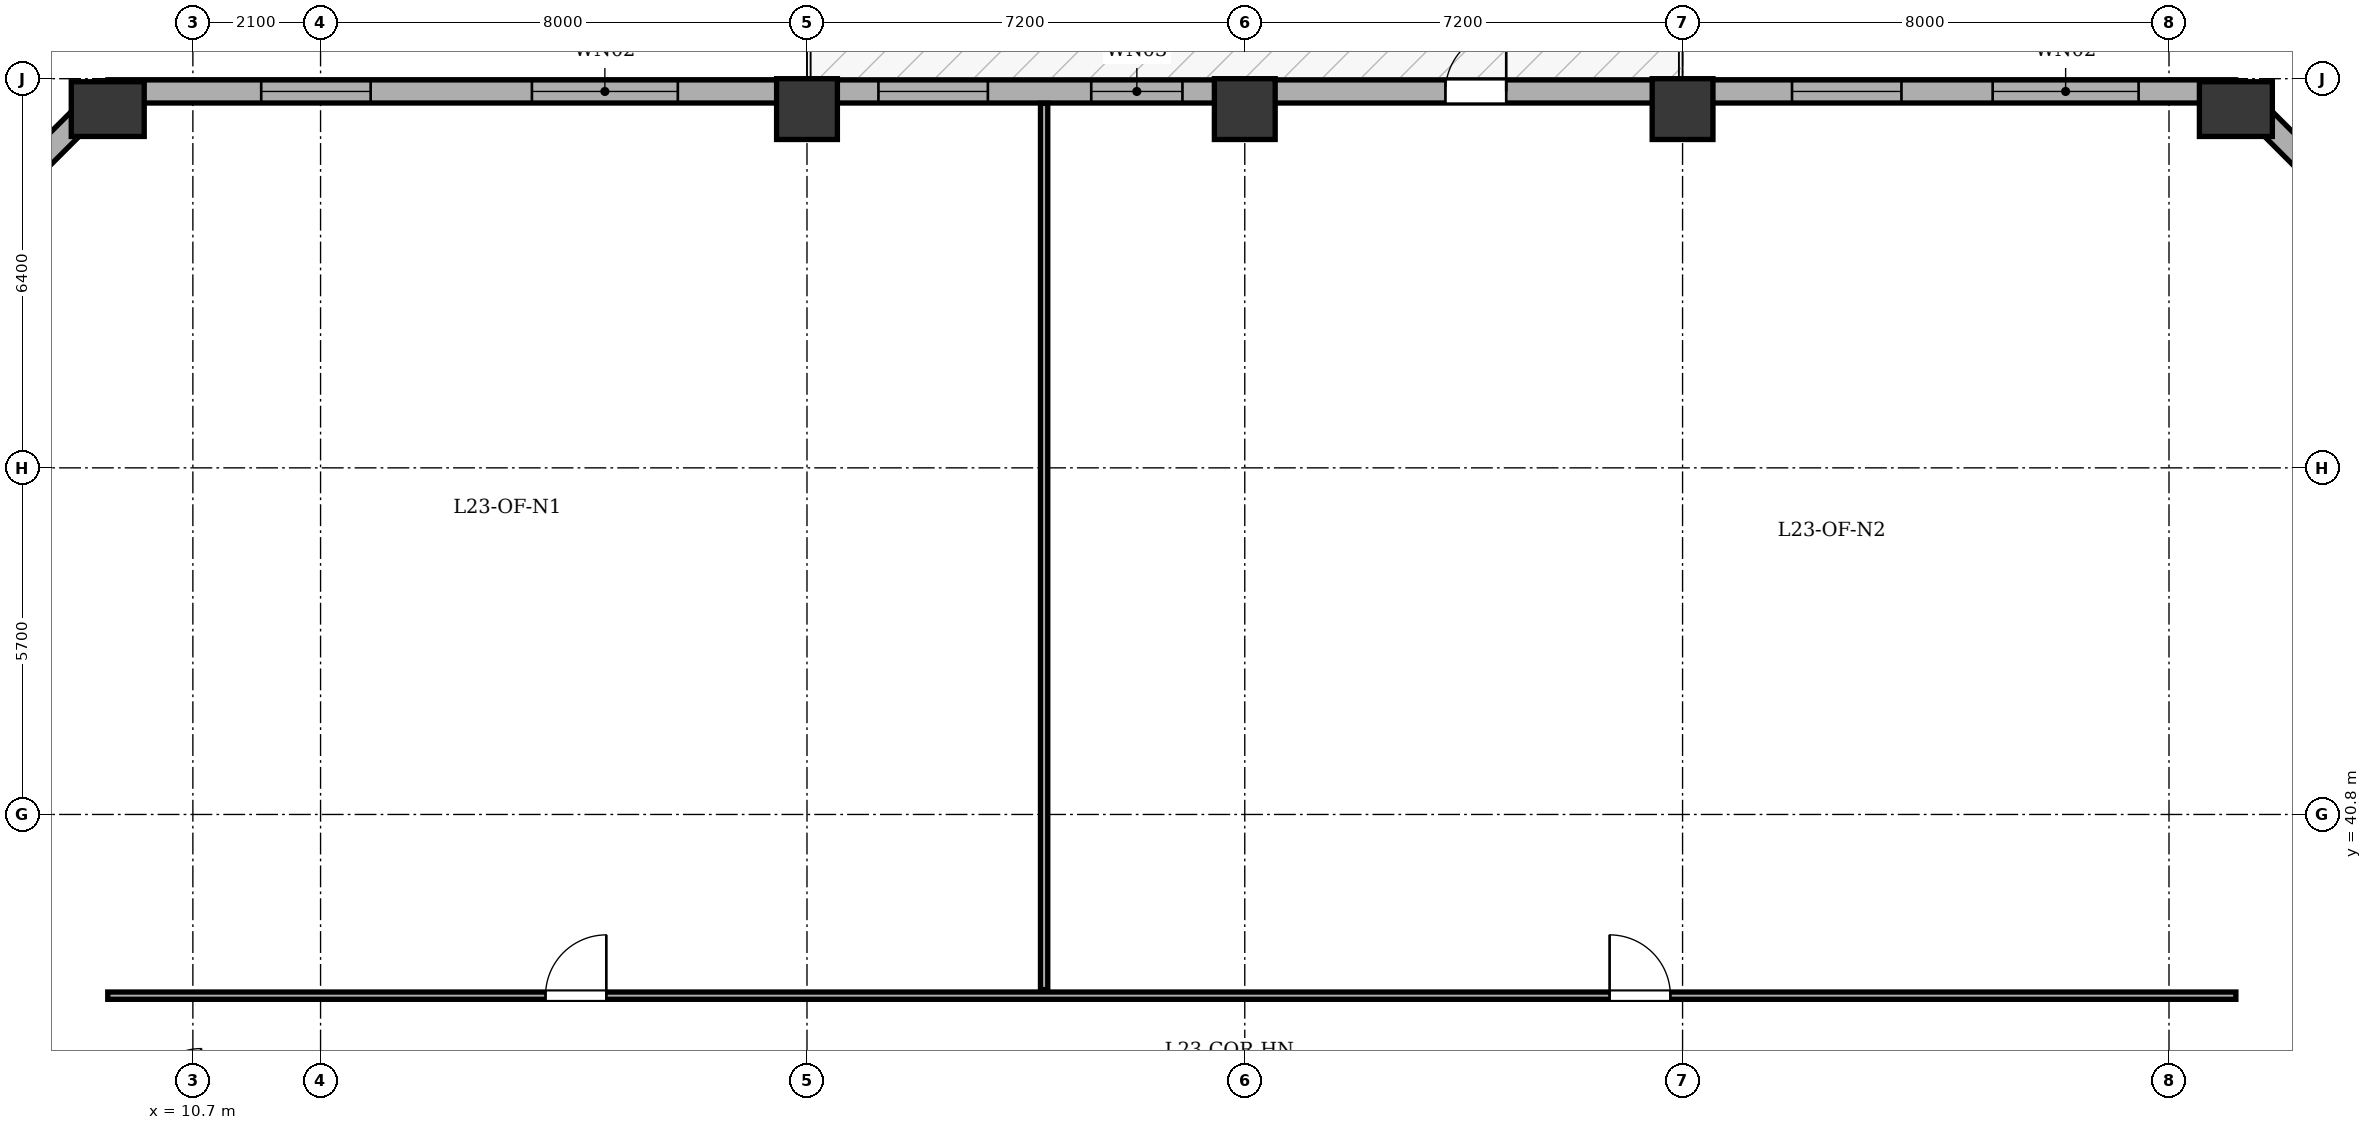
"""IFC4 building model, lengths in metres.
Left out: names, types, materials, properties, quantities, classifications, styles, units other than length and angle.
Written with IfcOpenShell. Run it as: python <this file> out.ifc"""

import sys

from ifc_helpers import new_model, si_unit, direction, frame, frame_2d, origin, origin_2d, place, context, subcontext, project, spatial, rectangle, extrude, element, fill, save


model = new_model("IFC4")
c1 = context("Model", 3, precision=1e-05, world=origin(), true_north=direction((0.0, 1.0)))
c2 = subcontext(c1, "Body", "Model", "MODEL_VIEW")
j1 = project(units=[si_unit("LENGTHUNIT", "METRE"), si_unit("PLANEANGLEUNIT", "RADIAN")], contexts=[c1])
p1 = place(None, origin())
s1 = spatial("IfcSite", under=j1, at=p1, CompositionType="ELEMENT")
p2 = place(p1, origin())
s2 = spatial("IfcBuilding", under=s1, at=p2, CompositionType="ELEMENT")
p3 = place(p2, frame((0.0, 0.0, 94.5)))
s3 = spatial("IfcBuildingStorey", under=s2, at=p3, CompositionType="ELEMENT", Elevation=94.5)
p4 = place(p3, frame((9.3, 52.4, 0.0), z_axis=(0.0, 0.0, 1.0), x_axis=(1.0, 0.0, 0.0)))
e1 = element("IfcColumn", 1, at=p4, inside=s3, PredefinedType="COLUMN", context=c2, shape_type="SweptSolid", body=[
    extrude(rectangle(XDim=0.9, YDim=1.2, at=origin_2d()), origin(), (0.0, 0.0, 1.0), 3.9),
])
for number, where, z_axis, x_axis in (
    (2, (20.8, 52.4, 0.0), (0.0, 0.0, 1.0), (1.0, 0.0, 0.0)),
    (3, (28.0, 52.4, 0.0), (0.0, 0.0, 1.0), (1.0, 0.0, 0.0)),
    (4, (35.2, 52.4, 0.0), (0.0, 0.0, 1.0), (1.0, 0.0, 0.0)),
):
    element("IfcColumn", number, at=place(p3, frame(where, z_axis=z_axis, x_axis=x_axis)), inside=s3, PredefinedType="COLUMN", context=c2, shape_type="SweptSolid", body=[
        extrude(rectangle(XDim=1.0, YDim=1.0, at=origin_2d()), origin(), (0.0, 0.0, 1.0), 3.9),
    ])
p5 = place(p3, frame((44.3, 52.4, 0.0), z_axis=(0.0, 0.0, 1.0), x_axis=(1.0, 0.0, 0.0)))
e5 = element("IfcColumn", 5, at=p5, inside=s3, PredefinedType="COLUMN", context=c2, shape_type="SweptSolid", body=[
    extrude(rectangle(XDim=0.9, YDim=1.2, at=origin_2d()), origin(), (0.0, 0.0, 1.0), 3.9),
])
p6 = place(p3, frame((4.51, 47.9, 0.0), z_axis=(0.0, 0.0, 1.0), x_axis=(0.707106781187, 0.707106781187, 0.0)))
e6 = element("IfcWall", 6, at=p6, inside=s3, PredefinedType="STANDARD", context=c2, shape_type="SweptSolid", body=[
    extrude(rectangle(XDim=6.774, YDim=0.38, at=frame_2d((3.387, 0.0))), origin(), (0.0, 0.0, 1.0), 3.135),
])
p7 = place(p6, frame((2.687, 0.0, 0.8)))
e7 = element("IfcOpeningElement", 7, at=p7, cuts=e6, PredefinedType="OPENING", context=c2, shape_type="SweptSolid", body=[
    extrude(rectangle(XDim=1.4, YDim=1.65, at=frame_2d((0.7, 0.825))), frame((0.0, 0.2, 0.0), z_axis=(0.0, -1.0, 0.0), x_axis=(1.0, 0.0, 0.0)), (0.0, 0.0, 1.0), 0.4),
])
p8 = place(p3, frame((9.3, 52.69, 0.0), z_axis=(0.0, 0.0, 1.0), x_axis=(1.0, 0.0, 0.0)))
e8 = element("IfcWall", 8, at=p8, inside=s3, PredefinedType="STANDARD", context=c2, shape_type="SweptSolid", body=[
    extrude(rectangle(XDim=35.0, YDim=0.38, at=frame_2d((17.5, 0.0))), origin(), (0.0, 0.0, 1.0), 3.135),
])
p9 = place(p8, frame((22.0, 0.0, 0.0)))
e9 = element("IfcOpeningElement", 9, at=p9, cuts=e8, PredefinedType="OPENING", context=c2, shape_type="SweptSolid", body=[
    extrude(rectangle(XDim=1.0, YDim=2.02, at=frame_2d((0.5, 1.01))), frame((0.0, 0.2, 0.0), z_axis=(0.0, -1.0, 0.0), x_axis=(1.0, 0.0, 0.0)), (0.0, 0.0, 1.0), 0.4),
])
p10 = place(p8, frame((2.524, 0.0, 0.8)))
e10 = element("IfcOpeningElement", 10, at=p10, cuts=e8, PredefinedType="OPENING", context=c2, shape_type="SweptSolid", body=[
    extrude(rectangle(XDim=1.8, YDim=1.9, at=frame_2d((0.9, 0.95))), frame((0.0, 0.2, 0.0), z_axis=(0.0, -1.0, 0.0), x_axis=(1.0, 0.0, 0.0)), (0.0, 0.0, 1.0), 0.4),
])
p11 = place(p8, frame((6.976, 0.0, 0.8)))
e11 = element("IfcOpeningElement", 11, at=p11, cuts=e8, PredefinedType="OPENING", context=c2, shape_type="SweptSolid", body=[
    extrude(rectangle(XDim=2.4, YDim=1.9, at=frame_2d((1.2, 0.95))), frame((0.0, 0.2, 0.0), z_axis=(0.0, -1.0, 0.0), x_axis=(1.0, 0.0, 0.0)), (0.0, 0.0, 1.0), 0.4),
])
p12 = place(p8, frame((12.675, 0.0, 0.8)))
e12 = element("IfcOpeningElement", 12, at=p12, cuts=e8, PredefinedType="OPENING", context=c2, shape_type="SweptSolid", body=[
    extrude(rectangle(XDim=1.8, YDim=1.9, at=frame_2d((0.9, 0.95))), frame((0.0, 0.2, 0.0), z_axis=(0.0, -1.0, 0.0), x_axis=(1.0, 0.0, 0.0)), (0.0, 0.0, 1.0), 0.4),
])
p13 = place(p8, frame((16.175, 0.0, 0.8)))
e13 = element("IfcOpeningElement", 13, at=p13, cuts=e8, PredefinedType="OPENING", context=c2, shape_type="SweptSolid", body=[
    extrude(rectangle(XDim=1.5, YDim=1.9, at=frame_2d((0.75, 0.95))), frame((0.0, 0.2, 0.0), z_axis=(0.0, -1.0, 0.0), x_axis=(1.0, 0.0, 0.0)), (0.0, 0.0, 1.0), 0.4),
])
p14 = place(p8, frame((27.7, 0.0, 0.8)))
e14 = element("IfcOpeningElement", 14, at=p14, cuts=e8, PredefinedType="OPENING", context=c2, shape_type="SweptSolid", body=[
    extrude(rectangle(XDim=1.8, YDim=1.9, at=frame_2d((0.9, 0.95))), frame((0.0, 0.2, 0.0), z_axis=(0.0, -1.0, 0.0), x_axis=(1.0, 0.0, 0.0)), (0.0, 0.0, 1.0), 0.4),
])
p15 = place(p8, frame((31.0, 0.0, 0.8)))
e15 = element("IfcOpeningElement", 15, at=p15, cuts=e8, PredefinedType="OPENING", context=c2, shape_type="SweptSolid", body=[
    extrude(rectangle(XDim=2.4, YDim=1.9, at=frame_2d((1.2, 0.95))), frame((0.0, 0.2, 0.0), z_axis=(0.0, -1.0, 0.0), x_axis=(1.0, 0.0, 0.0)), (0.0, 0.0, 1.0), 0.4),
])
p16 = place(p3, frame((44.3, 52.69, 0.0), z_axis=(0.0, 0.0, 1.0), x_axis=(0.707106781187, -0.707106781187, 0.0)))
e16 = element("IfcWall", 16, at=p16, inside=s3, PredefinedType="STANDARD", context=c2, shape_type="SweptSolid", body=[
    extrude(rectangle(XDim=6.774, YDim=0.38, at=frame_2d((3.387, 0.0))), origin(), (0.0, 0.0, 1.0), 3.135),
])
p17 = place(p16, frame((2.687, 0.0, 0.8)))
e17 = element("IfcOpeningElement", 17, at=p17, cuts=e16, PredefinedType="OPENING", context=c2, shape_type="SweptSolid", body=[
    extrude(rectangle(XDim=1.4, YDim=1.65, at=frame_2d((0.7, 0.825))), frame((0.0, 0.2, 0.0), z_axis=(0.0, -1.0, 0.0), x_axis=(1.0, 0.0, 0.0)), (0.0, 0.0, 1.0), 0.4),
])
p18 = place(p3, frame((9.3, 37.82, 0.0), z_axis=(0.0, 0.0, 1.0), x_axis=(1.0, 0.0, 0.0)))
e18 = element("IfcWall", 18, at=p18, inside=s3, PredefinedType="PARTITIONING", context=c2, shape_type="SweptSolid", body=[
    extrude(rectangle(XDim=35.0, YDim=0.12, at=frame_2d((17.5, 0.0))), origin(), (0.0, 0.0, 1.0), 3.6),
])
p19 = place(p18, frame((7.2, 0.0, 0.0)))
e19 = element("IfcOpeningElement", 19, at=p19, cuts=e18, PredefinedType="OPENING", context=c2, shape_type="SweptSolid", body=[
    extrude(rectangle(XDim=1.0, YDim=2.1, at=frame_2d((0.5, 1.05))), frame((0.0, 0.07, 0.0), z_axis=(0.0, -1.0, 0.0), x_axis=(1.0, 0.0, 0.0)), (0.0, 0.0, 1.0), 0.14),
])
p20 = place(p18, frame((24.7, 0.0, 0.0)))
e20 = element("IfcOpeningElement", 20, at=p20, cuts=e18, PredefinedType="OPENING", context=c2, shape_type="SweptSolid", body=[
    extrude(rectangle(XDim=1.0, YDim=2.1, at=frame_2d((0.5, 1.05))), frame((0.0, 0.07, 0.0), z_axis=(0.0, -1.0, 0.0), x_axis=(1.0, 0.0, 0.0)), (0.0, 0.0, 1.0), 0.14),
])
p21 = place(p3, frame((24.7, 37.92, 0.0), z_axis=(0.0, 0.0, 1.0), x_axis=(0.0, 1.0, 0.0)))
e21 = element("IfcWall", 21, at=p21, inside=s3, PredefinedType="PARTITIONING", context=c2, shape_type="SweptSolid", body=[
    extrude(rectangle(XDim=14.575, YDim=0.12, at=frame_2d((7.288, 0.0))), origin(), (0.0, 0.0, 1.0), 3.6),
])
p22 = place(p9, origin())
e22 = element("IfcDoor", 22, at=p22, inside=s3, OperationType="SINGLE_SWING_RIGHT", PredefinedType="DOOR", context=c2, shape_type="SweptSolid", body=[
    extrude(rectangle(XDim=1.0, YDim=2.02, at=frame_2d((0.5, 1.01))), frame((0.0, 0.025, 0.0), z_axis=(0.0, -1.0, 0.0), x_axis=(1.0, 0.0, 0.0)), (0.0, 0.0, 1.0), 0.05),
])
fill(e9, e22)
p23 = place(p10, origin())
e23 = element("IfcWindow", 23, at=p23, inside=s3, PartitioningType="SINGLE_PANEL", PredefinedType="WINDOW", context=c2, shape_type="SweptSolid", body=[
    extrude(rectangle(XDim=1.8, YDim=1.9, at=frame_2d((0.9, 0.95))), frame((0.0, -0.01, 0.0), z_axis=(0.0, -1.0, 0.0), x_axis=(1.0, 0.0, 0.0)), (0.0, 0.0, 1.0), 0.06),
])
fill(e10, e23)
p24 = place(p11, origin())
e24 = element("IfcWindow", 24, at=p24, inside=s3, PartitioningType="SINGLE_PANEL", PredefinedType="WINDOW", context=c2, shape_type="SweptSolid", body=[
    extrude(rectangle(XDim=2.4, YDim=1.9, at=frame_2d((1.2, 0.95))), frame((0.0, -0.01, 0.0), z_axis=(0.0, -1.0, 0.0), x_axis=(1.0, 0.0, 0.0)), (0.0, 0.0, 1.0), 0.06),
])
fill(e11, e24)
p25 = place(p12, origin())
e25 = element("IfcWindow", 25, at=p25, inside=s3, PartitioningType="SINGLE_PANEL", PredefinedType="WINDOW", context=c2, shape_type="SweptSolid", body=[
    extrude(rectangle(XDim=1.8, YDim=1.9, at=frame_2d((0.9, 0.95))), frame((0.0, -0.01, 0.0), z_axis=(0.0, -1.0, 0.0), x_axis=(1.0, 0.0, 0.0)), (0.0, 0.0, 1.0), 0.06),
])
fill(e12, e25)
p26 = place(p13, origin())
e26 = element("IfcWindow", 26, at=p26, inside=s3, PartitioningType="SINGLE_PANEL", PredefinedType="WINDOW", context=c2, shape_type="SweptSolid", body=[
    extrude(rectangle(XDim=1.5, YDim=1.9, at=frame_2d((0.75, 0.95))), frame((0.0, -0.01, 0.0), z_axis=(0.0, -1.0, 0.0), x_axis=(1.0, 0.0, 0.0)), (0.0, 0.0, 1.0), 0.06),
])
fill(e13, e26)
p27 = place(p14, origin())
e27 = element("IfcWindow", 27, at=p27, inside=s3, PartitioningType="SINGLE_PANEL", PredefinedType="WINDOW", context=c2, shape_type="SweptSolid", body=[
    extrude(rectangle(XDim=1.8, YDim=1.9, at=frame_2d((0.9, 0.95))), frame((0.0, -0.01, 0.0), z_axis=(0.0, -1.0, 0.0), x_axis=(1.0, 0.0, 0.0)), (0.0, 0.0, 1.0), 0.06),
])
fill(e14, e27)
p28 = place(p15, origin())
e28 = element("IfcWindow", 28, at=p28, inside=s3, PartitioningType="SINGLE_PANEL", PredefinedType="WINDOW", context=c2, shape_type="SweptSolid", body=[
    extrude(rectangle(XDim=2.4, YDim=1.9, at=frame_2d((1.2, 0.95))), frame((0.0, -0.01, 0.0), z_axis=(0.0, -1.0, 0.0), x_axis=(1.0, 0.0, 0.0)), (0.0, 0.0, 1.0), 0.06),
])
fill(e15, e28)
p29 = place(p19, origin())
e29 = element("IfcDoor", 29, at=p29, inside=s3, OperationType="SINGLE_SWING_RIGHT", PredefinedType="DOOR", context=c2, shape_type="SweptSolid", body=[
    extrude(rectangle(XDim=1.0, YDim=2.1, at=frame_2d((0.5, 1.05))), frame((0.0, 0.025, 0.0), z_axis=(0.0, -1.0, 0.0), x_axis=(1.0, 0.0, 0.0)), (0.0, 0.0, 1.0), 0.05),
])
fill(e19, e29)
p30 = place(p20, origin())
e30 = element("IfcDoor", 30, at=p30, inside=s3, OperationType="SINGLE_SWING_LEFT", PredefinedType="DOOR", context=c2, shape_type="SweptSolid", body=[
    extrude(rectangle(XDim=1.0, YDim=2.1, at=frame_2d((0.5, 1.05))), frame((0.0, 0.025, 0.0), z_axis=(0.0, -1.0, 0.0), x_axis=(1.0, 0.0, 0.0)), (0.0, 0.0, 1.0), 0.05),
])
fill(e20, e30)
save(model, sys.argv[1])
